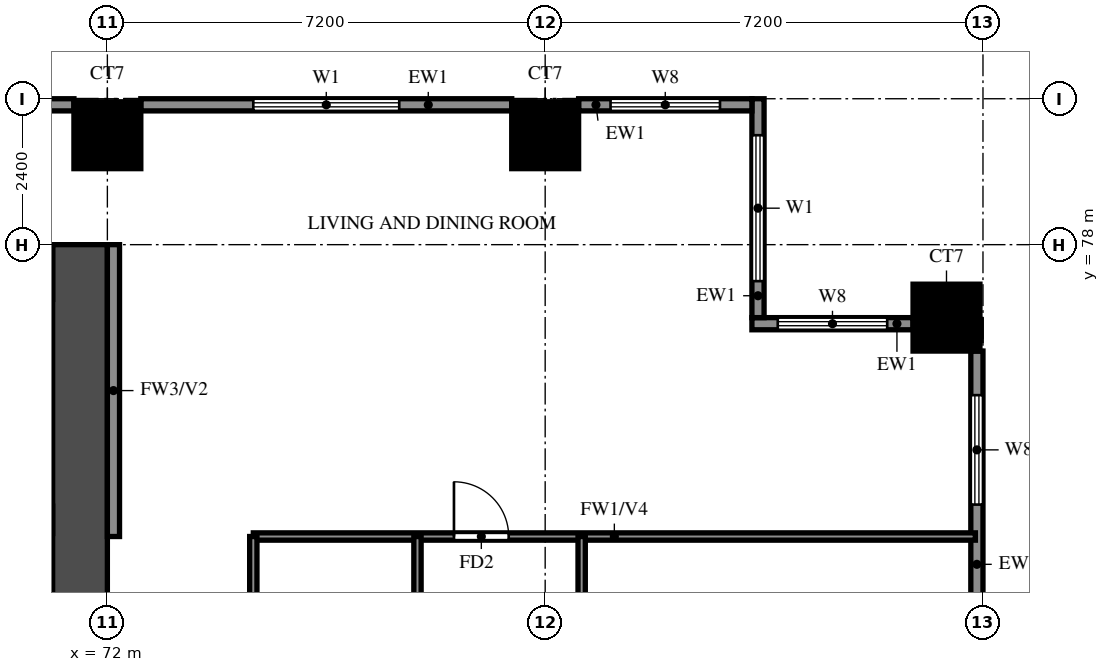
"""IFC4 building model, lengths in metres.
Left out: names, types, materials, properties, quantities, classifications, styles, units other than length and angle.
Written with IfcOpenShell. Run it as: python <this file> out.ifc"""

import sys

from ifc_helpers import new_model, si_unit, direction, frame, frame_2d, origin, origin_2d, place, context, subcontext, project, spatial, rectangle, extrude, source, transform, mapped, element, fill, save


model = new_model("IFC4")
c1 = context("Model", 3, precision=1e-05, world=origin(), true_north=direction((0.0, 1.0)))
c2 = subcontext(c1, "Body", "Model", "MODEL_VIEW")
j1 = project(units=[si_unit("LENGTHUNIT", "METRE"), si_unit("PLANEANGLEUNIT", "RADIAN")], contexts=[c1])
p1 = place(None, origin())
s1 = spatial("IfcSite", under=j1, at=p1, CompositionType="ELEMENT")
p2 = place(p1, origin())
s2 = spatial("IfcBuilding", under=s1, at=p2, CompositionType="ELEMENT")
p3 = place(p2, frame((0.0, 0.0, 58.5)))
s3 = spatial("IfcBuildingStorey", under=s2, at=p3, CompositionType="ELEMENT", Elevation=58.5)
m1 = source(origin(), c2, "Body", "SweptSolid", [
    extrude(rectangle(XDim=1.1, YDim=1.1, at=origin_2d()), origin(), (0.0, 0.0, 1.0), 3.18),
])
for number, where, z_axis, x_axis in (
    (1, (85.8, 76.8, 0.0), (0.0, 0.0, 1.0), (1.0, 0.0, 0.0)),
    (2, (72.0, 79.8, 0.0), (0.0, 0.0, 1.0), (1.0, 0.0, 0.0)),
    (3, (79.2, 79.8, 0.0), (0.0, 0.0, 1.0), (1.0, 0.0, 0.0)),
):
    element("IfcColumn", number, at=place(p3, frame(where, z_axis=z_axis, x_axis=x_axis)), inside=s3, PredefinedType="COLUMN", context=c2, shape_type="MappedRepresentation", body=[
        mapped(m1, transform((0.0, 0.0, 0.0))),
    ])
p4 = place(p3, frame((71.55, 66.0, 0.0), z_axis=(0.0, 0.0, 1.0), x_axis=(0.0, 1.0, 0.0)))
e4 = element("IfcWall", 4, at=p4, inside=s3, PredefinedType="SHEAR", context=c2, shape_type="SweptSolid", body=[
    extrude(rectangle(XDim=12.0, YDim=0.9, at=frame_2d((6.0, 0.0))), origin(), (0.0, 0.0, 1.0), 3.18),
])
p5 = place(p3, frame((29.7, 77.55, 0.0), z_axis=(0.0, 0.0, 1.0), x_axis=(1.0, 0.0, 0.0)))
e5 = element("IfcWall", 5, at=p5, inside=s3, PredefinedType="SHEAR", context=c2, shape_type="SweptSolid", body=[
    extrude(rectangle(XDim=41.4, YDim=0.9, at=frame_2d((20.7, 0.0))), origin(), (0.0, 0.0, 1.0), 3.18),
])
p6 = place(p3, frame((86.3, 70.15, 0.0), z_axis=(0.0, 0.0, 1.0), x_axis=(0.0, 1.0, 0.0)))
e6 = element("IfcWall", 6, at=p6, inside=s3, PredefinedType="SOLIDWALL", context=c2, shape_type="SweptSolid", body=[
    extrude(rectangle(XDim=6.1, YDim=0.2, at=frame_2d((3.05, 0.0))), origin(), (0.0, 0.0, 1.0), 3.18),
])
p7 = place(p6, frame((1.175, 0.0, 1.5)))
e7 = element("IfcOpeningElement", 7, at=p7, cuts=e6, PredefinedType="OPENING", context=c2, shape_type="SweptSolid", body=[
    extrude(rectangle(XDim=0.9, YDim=0.9, at=frame_2d((0.45, 0.45))), frame((0.0, 0.11, 0.0), z_axis=(0.0, -1.0, 0.0), x_axis=(1.0, 0.0, 0.0)), (0.0, 0.0, 1.0), 0.22),
])
p8 = place(p6, frame((3.575, 0.0, 0.6)))
e8 = element("IfcOpeningElement", 8, at=p8, cuts=e6, PredefinedType="OPENING", context=c2, shape_type="SweptSolid", body=[
    extrude(rectangle(XDim=1.8, YDim=2.4, at=frame_2d((0.9, 1.2))), frame((0.0, 0.11, 0.0), z_axis=(0.0, -1.0, 0.0), x_axis=(1.0, 0.0, 0.0)), (0.0, 0.0, 1.0), 0.22),
])
p9 = place(p3, frame((85.25, 76.7, 0.0), z_axis=(0.0, 0.0, 1.0), x_axis=(-1.0, 0.0, 0.0)))
e9 = element("IfcWall", 9, at=p9, inside=s3, PredefinedType="SOLIDWALL", context=c2, shape_type="SweptSolid", body=[
    extrude(rectangle(XDim=2.65, YDim=0.2, at=frame_2d((1.325, 0.0))), origin(), (0.0, 0.0, 1.0), 3.18),
])
p10 = place(p9, frame((0.425, 0.0, 0.6)))
e10 = element("IfcOpeningElement", 10, at=p10, cuts=e9, PredefinedType="OPENING", context=c2, shape_type="SweptSolid", body=[
    extrude(rectangle(XDim=1.8, YDim=2.4, at=frame_2d((0.9, 1.2))), frame((0.0, 0.11, 0.0), z_axis=(0.0, -1.0, 0.0), x_axis=(1.0, 0.0, 0.0)), (0.0, 0.0, 1.0), 0.22),
])
p11 = place(p3, frame((82.7, 76.8, 0.0), z_axis=(0.0, 0.0, 1.0), x_axis=(0.0, 1.0, 0.0)))
e11 = element("IfcWall", 11, at=p11, inside=s3, PredefinedType="SOLIDWALL", context=c2, shape_type="SweptSolid", body=[
    extrude(rectangle(XDim=3.6, YDim=0.2, at=frame_2d((1.8, 0.0))), origin(), (0.0, 0.0, 1.0), 3.18),
])
p12 = place(p11, frame((0.6, 0.0, 0.6)))
e12 = element("IfcOpeningElement", 12, at=p12, cuts=e11, PredefinedType="OPENING", context=c2, shape_type="SweptSolid", body=[
    extrude(rectangle(XDim=2.4, YDim=2.4, at=frame_2d((1.2, 1.2))), frame((0.0, 0.11, 0.0), z_axis=(0.0, -1.0, 0.0), x_axis=(1.0, 0.0, 0.0)), (0.0, 0.0, 1.0), 0.22),
])
p13 = place(p3, frame((82.6, 80.3, 0.0), z_axis=(0.0, 0.0, 1.0), x_axis=(-1.0, 0.0, 0.0)))
e13 = element("IfcWall", 13, at=p13, inside=s3, PredefinedType="SOLIDWALL", context=c2, shape_type="SweptSolid", body=[
    extrude(rectangle(XDim=2.85, YDim=0.2, at=frame_2d((1.425, 0.0))), origin(), (0.0, 0.0, 1.0), 3.18),
])
p14 = place(p13, frame((0.525, 0.0, 0.6)))
e14 = element("IfcOpeningElement", 14, at=p14, cuts=e13, PredefinedType="OPENING", context=c2, shape_type="SweptSolid", body=[
    extrude(rectangle(XDim=1.8, YDim=2.4, at=frame_2d((0.9, 1.2))), frame((0.0, 0.11, 0.0), z_axis=(0.0, -1.0, 0.0), x_axis=(1.0, 0.0, 0.0)), (0.0, 0.0, 1.0), 0.22),
])
p15 = place(p3, frame((78.65, 80.3, 0.0), z_axis=(0.0, 0.0, 1.0), x_axis=(-1.0, 0.0, 0.0)))
e15 = element("IfcWall", 15, at=p15, inside=s3, PredefinedType="SOLIDWALL", context=c2, shape_type="SweptSolid", body=[
    extrude(rectangle(XDim=6.1, YDim=0.2, at=frame_2d((3.05, 0.0))), origin(), (0.0, 0.0, 1.0), 3.18),
])
p16 = place(p15, frame((1.85, 0.0, 0.6)))
e16 = element("IfcOpeningElement", 16, at=p16, cuts=e15, PredefinedType="OPENING", context=c2, shape_type="SweptSolid", body=[
    extrude(rectangle(XDim=2.4, YDim=2.4, at=frame_2d((1.2, 1.2))), frame((0.0, 0.11, 0.0), z_axis=(0.0, -1.0, 0.0), x_axis=(1.0, 0.0, 0.0)), (0.0, 0.0, 1.0), 0.22),
])
p17 = place(p3, frame((71.45, 80.3, 0.0), z_axis=(0.0, 0.0, 1.0), x_axis=(-1.0, 0.0, 0.0)))
e17 = element("IfcWall", 17, at=p17, inside=s3, PredefinedType="SOLIDWALL", context=c2, shape_type="SweptSolid", body=[
    extrude(rectangle(XDim=6.1, YDim=0.2, at=frame_2d((3.05, 0.0))), origin(), (0.0, 0.0, 1.0), 3.18),
])
p18 = place(p3, frame((72.1, 73.2, 0.0), z_axis=(0.0, 0.0, 1.0), x_axis=(0.0, 1.0, 0.0)))
e18 = element("IfcWall", 18, at=p18, inside=s3, PredefinedType="SOLIDWALL", context=c2, shape_type="SweptSolid", body=[
    extrude(rectangle(XDim=4.8, YDim=0.2, at=frame_2d((2.4, 0.0))), origin(), (0.0, 0.0, 1.0), 3.18),
])
p19 = place(p3, frame((74.4, 73.2, 0.0), z_axis=(0.0, 0.0, 1.0), x_axis=(1.0, 0.0, 0.0)))
e19 = element("IfcWall", 19, at=p19, inside=s3, PredefinedType="PARTITIONING", context=c2, shape_type="SweptSolid", body=[
    extrude(rectangle(XDim=11.875, YDim=0.12, at=frame_2d((5.938, 0.0))), origin(), (0.0, 0.0, 1.0), 2.28),
])
p20 = place(p19, frame((3.3, 0.0, 0.0)))
e20 = element("IfcOpeningElement", 20, at=p20, cuts=e19, PredefinedType="OPENING", context=c2, shape_type="SweptSolid", body=[
    extrude(rectangle(XDim=0.9, YDim=2.1, at=frame_2d((0.45, 1.05))), frame((0.0, 0.07, 0.0), z_axis=(0.0, -1.0, 0.0), x_axis=(1.0, 0.0, 0.0)), (0.0, 0.0, 1.0), 0.14),
])
p21 = place(p3, frame((74.4, 69.85, 0.0), z_axis=(0.0, 0.0, 1.0), x_axis=(0.0, 1.0, 0.0)))
e21 = element("IfcWall", 21, at=p21, inside=s3, PredefinedType="PARTITIONING", context=c2, shape_type="SweptSolid", body=[
    extrude(rectangle(XDim=3.35, YDim=0.12, at=frame_2d((1.675, 0.0))), origin(), (0.0, 0.0, 1.0), 3.18),
])
p22 = place(p3, frame((77.1, 61.2, 0.0), z_axis=(0.0, 0.0, 1.0), x_axis=(0.0, 1.0, 0.0)))
e22 = element("IfcWall", 22, at=p22, inside=s3, PredefinedType="PARTITIONING", context=c2, shape_type="SweptSolid", body=[
    extrude(rectangle(XDim=12.0, YDim=0.12, at=frame_2d((6.0, 0.0))), origin(), (0.0, 0.0, 1.0), 3.18),
])
p23 = place(p22, frame((1.475, 0.0, 0.0)))
e23 = element("IfcOpeningElement", 23, at=p23, cuts=e22, PredefinedType="OPENING", context=c2, shape_type="SweptSolid", body=[
    extrude(rectangle(XDim=0.9, YDim=2.1, at=frame_2d((0.45, 1.05))), frame((0.0, 0.07, 0.0), z_axis=(0.0, -1.0, 0.0), x_axis=(1.0, 0.0, 0.0)), (0.0, 0.0, 1.0), 0.14),
])
p24 = place(p22, frame((5.8, 0.0, 0.0)))
e24 = element("IfcOpeningElement", 24, at=p24, cuts=e22, PredefinedType="OPENING", context=c2, shape_type="SweptSolid", body=[
    extrude(rectangle(XDim=0.9, YDim=2.1, at=frame_2d((0.45, 1.05))), frame((0.0, 0.07, 0.0), z_axis=(0.0, -1.0, 0.0), x_axis=(1.0, 0.0, 0.0)), (0.0, 0.0, 1.0), 0.14),
])
p25 = place(p22, frame((9.925, 0.0, 0.0)))
e25 = element("IfcOpeningElement", 25, at=p25, cuts=e22, PredefinedType="OPENING", context=c2, shape_type="SweptSolid", body=[
    extrude(rectangle(XDim=0.8, YDim=2.1, at=frame_2d((0.4, 1.05))), frame((0.0, 0.07, 0.0), z_axis=(0.0, -1.0, 0.0), x_axis=(1.0, 0.0, 0.0)), (0.0, 0.0, 1.0), 0.14),
])
p26 = place(p3, frame((79.8, 69.6, 0.0), z_axis=(0.0, 0.0, 1.0), x_axis=(0.0, 1.0, 0.0)))
e26 = element("IfcWall", 26, at=p26, inside=s3, PredefinedType="PARTITIONING", context=c2, shape_type="SweptSolid", body=[
    extrude(rectangle(XDim=3.6, YDim=0.12, at=frame_2d((1.8, 0.0))), origin(), (0.0, 0.0, 1.0), 3.18),
])
p27 = place(p8, origin())
e27 = element("IfcWindow", 27, at=p27, inside=s3, PartitioningType="DOUBLE_PANEL_VERTICAL", PredefinedType="WINDOW", context=c2, shape_type="SweptSolid", body=[
    extrude(rectangle(XDim=1.8, YDim=2.4, at=frame_2d((0.9, 1.2))), frame((0.0, 0.03, 0.0), z_axis=(0.0, -1.0, 0.0), x_axis=(1.0, 0.0, 0.0)), (0.0, 0.0, 1.0), 0.06),
])
fill(e8, e27)
p28 = place(p10, origin())
e28 = element("IfcWindow", 28, at=p28, inside=s3, PartitioningType="DOUBLE_PANEL_VERTICAL", PredefinedType="WINDOW", context=c2, shape_type="SweptSolid", body=[
    extrude(rectangle(XDim=1.8, YDim=2.4, at=frame_2d((0.9, 1.2))), frame((0.0, 0.03, 0.0), z_axis=(0.0, -1.0, 0.0), x_axis=(1.0, 0.0, 0.0)), (0.0, 0.0, 1.0), 0.06),
])
fill(e10, e28)
p29 = place(p12, origin())
e29 = element("IfcWindow", 29, at=p29, inside=s3, PartitioningType="DOUBLE_PANEL_VERTICAL", PredefinedType="WINDOW", context=c2, shape_type="SweptSolid", body=[
    extrude(rectangle(XDim=2.4, YDim=2.4, at=frame_2d((1.2, 1.2))), frame((0.0, 0.03, 0.0), z_axis=(0.0, -1.0, 0.0), x_axis=(1.0, 0.0, 0.0)), (0.0, 0.0, 1.0), 0.06),
])
fill(e12, e29)
p30 = place(p14, origin())
e30 = element("IfcWindow", 30, at=p30, inside=s3, PartitioningType="DOUBLE_PANEL_VERTICAL", PredefinedType="WINDOW", context=c2, shape_type="SweptSolid", body=[
    extrude(rectangle(XDim=1.8, YDim=2.4, at=frame_2d((0.9, 1.2))), frame((0.0, 0.03, 0.0), z_axis=(0.0, -1.0, 0.0), x_axis=(1.0, 0.0, 0.0)), (0.0, 0.0, 1.0), 0.06),
])
fill(e14, e30)
p31 = place(p16, origin())
e31 = element("IfcWindow", 31, at=p31, inside=s3, PartitioningType="DOUBLE_PANEL_VERTICAL", PredefinedType="WINDOW", context=c2, shape_type="SweptSolid", body=[
    extrude(rectangle(XDim=2.4, YDim=2.4, at=frame_2d((1.2, 1.2))), frame((0.0, 0.03, 0.0), z_axis=(0.0, -1.0, 0.0), x_axis=(1.0, 0.0, 0.0)), (0.0, 0.0, 1.0), 0.06),
])
fill(e16, e31)
p32 = place(p20, origin())
e32 = element("IfcDoor", 32, at=p32, inside=s3, OperationType="SINGLE_SWING_LEFT", PredefinedType="DOOR", context=c2, shape_type="SweptSolid", body=[
    extrude(rectangle(XDim=0.9, YDim=2.1, at=frame_2d((0.45, 1.05))), frame((0.0, 0.025, 0.0), z_axis=(0.0, -1.0, 0.0), x_axis=(1.0, 0.0, 0.0)), (0.0, 0.0, 1.0), 0.05),
])
fill(e20, e32)
save(model, sys.argv[1])
